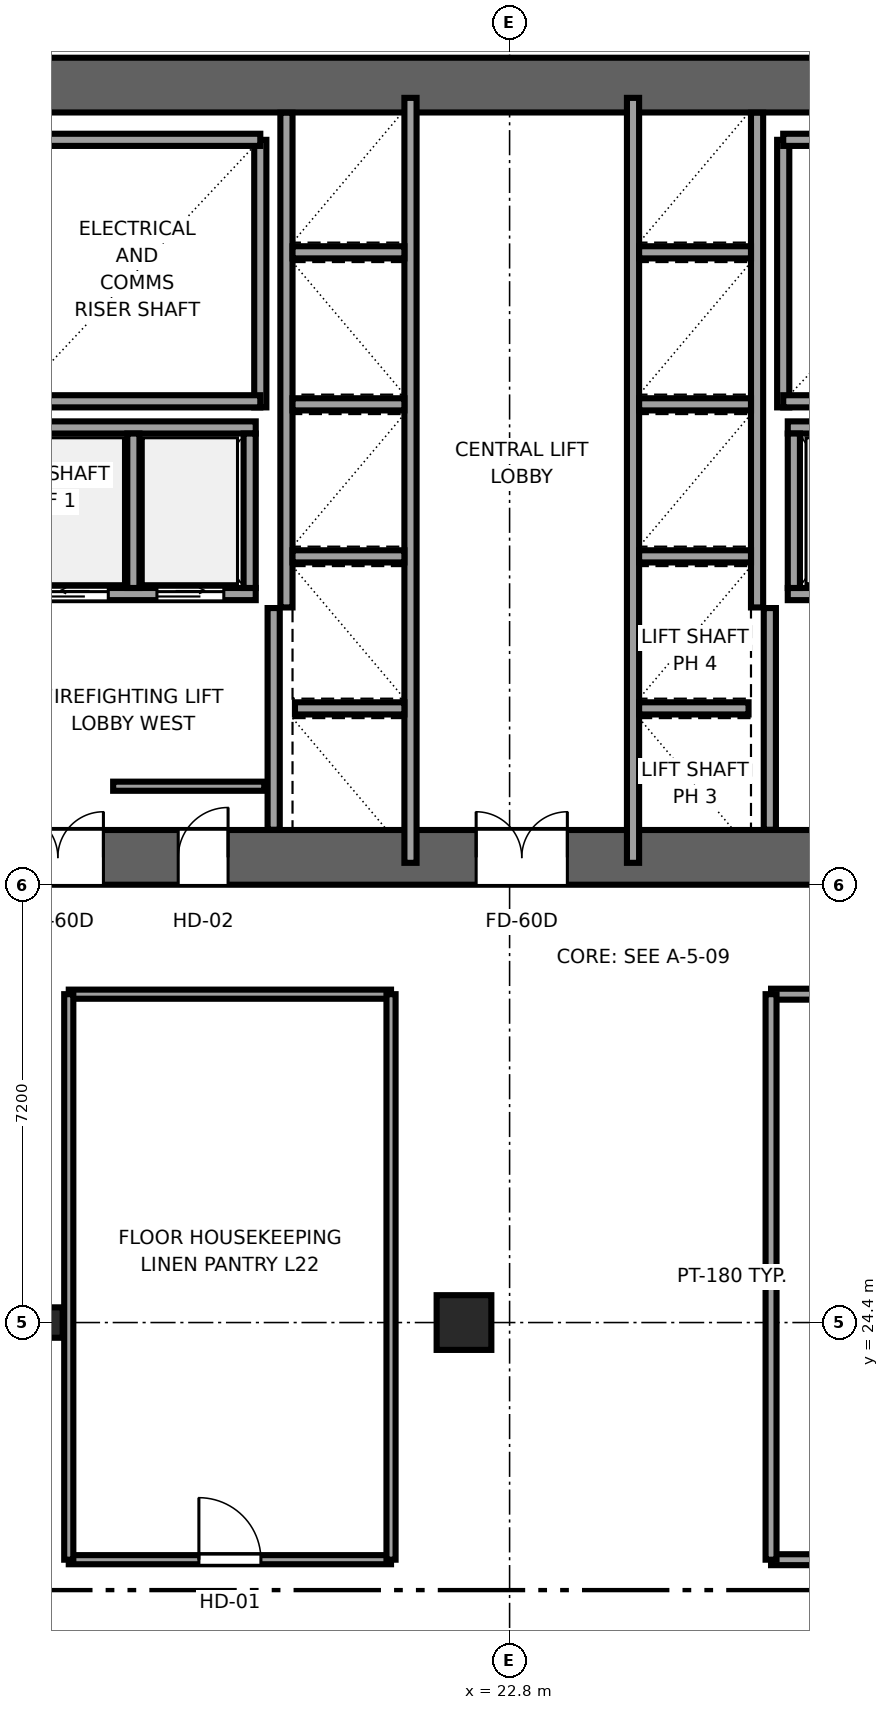
"""IFC4 building model, lengths in metres.
Left out: names, types, materials, properties, quantities, classifications, styles, units other than length and angle.
Written with IfcOpenShell. Run it as: python <this file> out.ifc"""

import sys

from ifc_helpers import new_model, si_unit, direction, frame, frame_2d, origin, origin_2d, place, context, subcontext, project, spatial, rectangle, i_section, extrude, source, transform, mapped, element, fill, save


model = new_model("IFC4")
c1 = context("Model", 3, precision=1e-05, world=origin(), true_north=direction((0.0, 1.0)))
c2 = subcontext(c1, "Body", "Model", "MODEL_VIEW")
j1 = project(units=[si_unit("LENGTHUNIT", "METRE"), si_unit("PLANEANGLEUNIT", "RADIAN")], contexts=[c1])
p1 = place(None, origin())
s1 = spatial("IfcSite", under=j1, at=p1, CompositionType="ELEMENT")
p2 = place(p1, origin())
s2 = spatial("IfcBuilding", under=s1, at=p2, CompositionType="ELEMENT")
p3 = place(p2, frame((0.0, 0.0, 88.8)))
s3 = spatial("IfcBuildingStorey", under=s2, at=p3, CompositionType="ELEMENT", Elevation=88.8)
p4 = place(p3, frame((9.6, 32.05, 0.0), z_axis=(0.0, 0.0, 1.0), x_axis=(1.0, 0.0, 0.0)))
e1 = element("IfcWall", 1, at=p4, inside=s3, PredefinedType="SHEAR", context=c2, shape_type="SweptSolid", body=[
    extrude(rectangle(XDim=26.8, YDim=0.9, at=frame_2d((13.4, 0.0))), origin(), (0.0, 0.0, 1.0), 3.55),
])
p5 = place(p4, frame((6.52, 0.0, 0.0), z_axis=(0.0, 0.0, 1.0), x_axis=(-1.0, 0.0, 0.0)))
e2 = element("IfcOpeningElement", 2, at=p5, cuts=e1, PredefinedType="OPENING", context=c2, shape_type="SweptSolid", body=[
    extrude(rectangle(XDim=1.5, YDim=2.04, at=frame_2d((0.75, 1.02))), frame((0.0, 0.46, 0.0), z_axis=(0.0, -1.0, 0.0), x_axis=(1.0, 0.0, 0.0)), (0.0, 0.0, 1.0), 0.92),
])
p6 = place(p4, frame((14.15, 0.0, 0.0), z_axis=(0.0, 0.0, 1.0), x_axis=(-1.0, 0.0, 0.0)))
e3 = element("IfcOpeningElement", 3, at=p6, cuts=e1, PredefinedType="OPENING", context=c2, shape_type="SweptSolid", body=[
    extrude(rectangle(XDim=1.5, YDim=2.04, at=frame_2d((0.75, 1.02))), frame((0.0, 0.46, 0.0), z_axis=(0.0, -1.0, 0.0), x_axis=(1.0, 0.0, 0.0)), (0.0, 0.0, 1.0), 0.92),
])
p7 = place(p4, frame((20.45, 0.0, 0.0), z_axis=(0.0, 0.0, 1.0), x_axis=(-1.0, 0.0, 0.0)))
e4 = element("IfcOpeningElement", 4, at=p7, cuts=e1, PredefinedType="OPENING", context=c2, shape_type="SweptSolid", body=[
    extrude(rectangle(XDim=1.5, YDim=2.04, at=frame_2d((0.75, 1.02))), frame((0.0, 0.46, 0.0), z_axis=(0.0, -1.0, 0.0), x_axis=(1.0, 0.0, 0.0)), (0.0, 0.0, 1.0), 0.92),
])
p8 = place(p4, frame((8.57, 0.0, 0.0), z_axis=(0.0, 0.0, 1.0), x_axis=(-1.0, 0.0, 0.0)))
e5 = element("IfcOpeningElement", 5, at=p8, cuts=e1, PredefinedType="OPENING", context=c2, shape_type="SweptSolid", body=[
    extrude(rectangle(XDim=0.82, YDim=2.01, at=frame_2d((0.41, 1.005))), frame((0.0, 0.46, 0.0), z_axis=(0.0, -1.0, 0.0), x_axis=(1.0, 0.0, 0.0)), (0.0, 0.0, 1.0), 0.92),
])
p9 = place(p3, frame((9.6, 44.75, 0.0), z_axis=(0.0, 0.0, 1.0), x_axis=(1.0, 0.0, 0.0)))
e6 = element("IfcWall", 6, at=p9, inside=s3, PredefinedType="SHEAR", context=c2, shape_type="SweptSolid", body=[
    extrude(rectangle(XDim=26.8, YDim=0.9, at=frame_2d((13.4, 0.0))), origin(), (0.0, 0.0, 1.0), 3.55),
])
m1 = source(origin(), c2, "Body", "SweptSolid", [
    extrude(i_section(OverallWidth=0.5, OverallDepth=0.5, WebThickness=0.022, FlangeThickness=0.034, at=origin_2d()), origin(), (0.0, 0.0, 1.0), 3.55),
])
p10 = place(p3, frame((15.2, 24.4, 0.0), z_axis=(0.0, 0.0, 1.0), x_axis=(1.0, 0.0, 0.0)))
e7 = element("IfcColumn", 7, at=p10, inside=s3, PredefinedType="COLUMN", context=c2, shape_type="MappedRepresentation", body=[
    mapped(m1, transform((0.0, 0.0, 0.0), x_axis=(1.0, 0.0, 0.0), y_axis=(0.0, 1.0, 0.0), z_axis=(0.0, 0.0, 1.0), scale=1.0)),
])
m2 = source(origin(), c2, "Body", "SweptSolid", [
    extrude(rectangle(XDim=0.9, YDim=0.9, at=origin_2d()), origin(), (0.0, 0.0, 1.0), 3.55),
])
p11 = place(p3, frame((22.05, 24.4, 0.0), z_axis=(0.0, 0.0, 1.0), x_axis=(1.0, 0.0, 0.0)))
e8 = element("IfcColumn", 8, at=p11, inside=s3, PredefinedType="COLUMN", context=c2, shape_type="MappedRepresentation", body=[
    mapped(m2, transform((0.0, 0.0, 0.0), x_axis=(1.0, 0.0, 0.0), y_axis=(0.0, 1.0, 0.0), z_axis=(0.0, 0.0, 1.0), scale=1.0)),
])
p12 = place(p3, frame((18.7, 39.45, 0.0), z_axis=(0.0, 0.0, 1.0), x_axis=(0.0, 1.0, 0.0)))
e9 = element("IfcWall", 9, at=p12, inside=s3, PredefinedType="SOLIDWALL", context=c2, shape_type="SweptSolid", body=[
    extrude(rectangle(XDim=4.4, YDim=0.2, at=frame_2d((2.2, 0.0))), origin(), (0.0, 0.0, 1.0), 3.37),
])
for number, where, z_axis, x_axis in (
    (10, (14.6, 39.55, 0.0), (0.0, 0.0, 1.0), (1.0, 0.0, 0.0)),
    (11, (14.6, 43.85, 0.0), (0.0, 0.0, 1.0), (1.0, 0.0, 0.0)),
):
    element("IfcWall", number, at=place(p3, frame(where, z_axis=z_axis, x_axis=x_axis)), inside=s3, PredefinedType="SOLIDWALL", context=c2, shape_type="SweptSolid", body=[
        extrude(rectangle(XDim=4.1, YDim=0.2, at=frame_2d((2.05, 0.0))), origin(), (0.0, 0.0, 1.0), 3.37),
    ])
p13 = place(p3, frame((27.3, 39.45, 0.0), z_axis=(0.0, 0.0, 1.0), x_axis=(0.0, 1.0, 0.0)))
e12 = element("IfcWall", 12, at=p13, inside=s3, PredefinedType="SOLIDWALL", context=c2, shape_type="SweptSolid", body=[
    extrude(rectangle(XDim=4.4, YDim=0.2, at=frame_2d((2.2, 0.0))), origin(), (0.0, 0.0, 1.0), 3.37),
])
for number, where, z_axis, x_axis in (
    (13, (27.3, 39.55, 0.0), (0.0, 0.0, 1.0), (1.0, 0.0, 0.0)),
    (14, (27.3, 43.85, 0.0), (0.0, 0.0, 1.0), (1.0, 0.0, 0.0)),
):
    element("IfcWall", number, at=place(p3, frame(where, z_axis=z_axis, x_axis=x_axis)), inside=s3, PredefinedType="SOLIDWALL", context=c2, shape_type="SweptSolid", body=[
        extrude(rectangle(XDim=4.1, YDim=0.2, at=frame_2d((2.05, 0.0))), origin(), (0.0, 0.0, 1.0), 3.37),
    ])
for number, where, z_axis, x_axis in (
    (15, (18.92, 32.504, 0.0), (0.0, 0.0, 1.0), (0.0, 1.0, 0.0)),
    (16, (27.08, 32.504, 0.0), (0.0, 0.0, 1.0), (0.0, 1.0, 0.0)),
):
    element("IfcWall", number, at=place(p3, frame(where, z_axis=z_axis, x_axis=x_axis)), inside=s3, PredefinedType="SOLIDWALL", context=c2, shape_type="SweptSolid", body=[
        extrude(rectangle(XDim=3.646, YDim=0.2, at=frame_2d((1.823, 0.0))), origin(), (0.0, 0.0, 1.0), 3.37),
    ])
p14 = place(p3, frame((21.17, 31.96, 0.0), z_axis=(0.0, 0.0, 1.0), x_axis=(0.0, 1.0, 0.0)))
e17 = element("IfcWall", 17, at=p14, inside=s3, PredefinedType="SOLIDWALL", context=c2, shape_type="SweptSolid", body=[
    extrude(rectangle(XDim=12.58, YDim=0.2, at=frame_2d((6.29, 0.0))), origin(), (0.0, 0.0, 1.0), 3.37),
])
p15 = place(p3, frame((19.13, 36.16, 0.0), z_axis=(0.0, 0.0, 1.0), x_axis=(0.0, 1.0, 0.0)))
e18 = element("IfcWall", 18, at=p15, inside=s3, PredefinedType="SOLIDWALL", context=c2, shape_type="SweptSolid", body=[
    extrude(rectangle(XDim=8.136, YDim=0.2, at=frame_2d((4.068, 0.0))), origin(), (0.0, 0.0, 1.0), 3.37),
])
p16 = place(p3, frame((19.27, 34.5, 0.0), z_axis=(0.0, 0.0, 1.0), x_axis=(1.0, 0.0, 0.0)))
e19 = element("IfcWall", 19, at=p16, inside=s3, PredefinedType="SOLIDWALL", context=c2, shape_type="SweptSolid", body=[
    extrude(rectangle(XDim=1.8, YDim=0.2, at=frame_2d((0.9, 0.0))), origin(), (0.0, 0.0, 1.0), 3.37),
])
for number, where, z_axis, x_axis in (
    (20, (19.23, 37.0, 0.0), (0.0, 0.0, 1.0), (1.0, 0.0, 0.0)),
    (21, (19.23, 39.5, 0.0), (0.0, 0.0, 1.0), (1.0, 0.0, 0.0)),
    (22, (19.23, 42.0, 0.0), (0.0, 0.0, 1.0), (1.0, 0.0, 0.0)),
):
    element("IfcWall", number, at=place(p3, frame(where, z_axis=z_axis, x_axis=x_axis)), inside=s3, PredefinedType="SOLIDWALL", context=c2, shape_type="SweptSolid", body=[
        extrude(rectangle(XDim=1.84, YDim=0.2, at=frame_2d((0.92, 0.0))), origin(), (0.0, 0.0, 1.0), 3.37),
    ])
p17 = place(p3, frame((27.375, 36.38, 0.0), z_axis=(0.0, 0.0, 1.0), x_axis=(1.0, 0.0, 0.0)))
e23 = element("IfcWall", 23, at=p17, inside=s3, PredefinedType="SOLIDWALL", context=c2, shape_type="SweptSolid", body=[
    extrude(rectangle(XDim=4.075, YDim=0.2, at=frame_2d((2.038, 0.0))), origin(), (0.0, 0.0, 1.0), 3.37),
])
p18 = place(p17, frame((0.525, 0.0, 0.0)))
e24 = element("IfcOpeningElement", 24, at=p18, cuts=e23, PredefinedType="OPENING", context=c2, shape_type="SweptSolid", body=[
    extrude(rectangle(XDim=1.1, YDim=2.12, at=frame_2d((0.55, 1.06))), frame((0.0, 0.11, 0.0), z_axis=(0.0, -1.0, 0.0), x_axis=(1.0, 0.0, 0.0)), (0.0, 0.0, 1.0), 0.22),
])
p19 = place(p17, frame((2.425, 0.0, 0.0)))
e25 = element("IfcOpeningElement", 25, at=p19, cuts=e23, PredefinedType="OPENING", context=c2, shape_type="SweptSolid", body=[
    extrude(rectangle(XDim=1.1, YDim=2.12, at=frame_2d((0.55, 1.06))), frame((0.0, 0.11, 0.0), z_axis=(0.0, -1.0, 0.0), x_axis=(1.0, 0.0, 0.0)), (0.0, 0.0, 1.0), 0.22),
])
p20 = place(p3, frame((27.375, 39.12, 0.0), z_axis=(0.0, 0.0, 1.0), x_axis=(1.0, 0.0, 0.0)))
e26 = element("IfcWall", 26, at=p20, inside=s3, PredefinedType="SOLIDWALL", context=c2, shape_type="SweptSolid", body=[
    extrude(rectangle(XDim=4.075, YDim=0.2, at=frame_2d((2.038, 0.0))), origin(), (0.0, 0.0, 1.0), 3.37),
])
p21 = place(p3, frame((27.475, 36.48, 0.0), z_axis=(0.0, 0.0, 1.0), x_axis=(0.0, 1.0, 0.0)))
e27 = element("IfcWall", 27, at=p21, inside=s3, PredefinedType="SOLIDWALL", context=c2, shape_type="SweptSolid", body=[
    extrude(rectangle(XDim=2.54, YDim=0.2, at=frame_2d((1.27, 0.0))), origin(), (0.0, 0.0, 1.0), 3.37),
])
p22 = place(p3, frame((14.55, 36.38, 0.0), z_axis=(0.0, 0.0, 1.0), x_axis=(1.0, 0.0, 0.0)))
e28 = element("IfcWall", 28, at=p22, inside=s3, PredefinedType="SOLIDWALL", context=c2, shape_type="SweptSolid", body=[
    extrude(rectangle(XDim=4.075, YDim=0.2, at=frame_2d((2.038, 0.0))), origin(), (0.0, 0.0, 1.0), 3.37),
])
p23 = place(p22, frame((0.55, 0.0, 0.0)))
e29 = element("IfcOpeningElement", 29, at=p23, cuts=e28, PredefinedType="OPENING", context=c2, shape_type="SweptSolid", body=[
    extrude(rectangle(XDim=1.1, YDim=2.12, at=frame_2d((0.55, 1.06))), frame((0.0, 0.11, 0.0), z_axis=(0.0, -1.0, 0.0), x_axis=(1.0, 0.0, 0.0)), (0.0, 0.0, 1.0), 0.22),
])
p24 = place(p22, frame((2.45, 0.0, 0.0)))
e30 = element("IfcOpeningElement", 30, at=p24, cuts=e28, PredefinedType="OPENING", context=c2, shape_type="SweptSolid", body=[
    extrude(rectangle(XDim=1.1, YDim=2.12, at=frame_2d((0.55, 1.06))), frame((0.0, 0.11, 0.0), z_axis=(0.0, -1.0, 0.0), x_axis=(1.0, 0.0, 0.0)), (0.0, 0.0, 1.0), 0.22),
])
p25 = place(p3, frame((14.55, 39.12, 0.0), z_axis=(0.0, 0.0, 1.0), x_axis=(1.0, 0.0, 0.0)))
e31 = element("IfcWall", 31, at=p25, inside=s3, PredefinedType="SOLIDWALL", context=c2, shape_type="SweptSolid", body=[
    extrude(rectangle(XDim=4.075, YDim=0.2, at=frame_2d((2.038, 0.0))), origin(), (0.0, 0.0, 1.0), 3.37),
])
for number, where, z_axis, x_axis in (
    (32, (18.525, 36.48, 0.0), (0.0, 0.0, 1.0), (0.0, 1.0, 0.0)),
    (33, (16.613, 36.48, 0.0), (0.0, 0.0, 1.0), (0.0, 1.0, 0.0)),
):
    element("IfcWall", number, at=place(p3, frame(where, z_axis=z_axis, x_axis=x_axis)), inside=s3, PredefinedType="SOLIDWALL", context=c2, shape_type="SweptSolid", body=[
        extrude(rectangle(XDim=2.54, YDim=0.2, at=frame_2d((1.27, 0.0))), origin(), (0.0, 0.0, 1.0), 3.37),
    ])
p26 = place(p3, frame((24.83, 31.96, 0.0), z_axis=(0.0, 0.0, 1.0), x_axis=(0.0, 1.0, 0.0)))
e34 = element("IfcWall", 34, at=p26, inside=s3, PredefinedType="SOLIDWALL", context=c2, shape_type="SweptSolid", body=[
    extrude(rectangle(XDim=12.58, YDim=0.2, at=frame_2d((6.29, 0.0))), origin(), (0.0, 0.0, 1.0), 3.37),
])
p27 = place(p3, frame((26.87, 36.16, 0.0), z_axis=(0.0, 0.0, 1.0), x_axis=(0.0, 1.0, 0.0)))
e35 = element("IfcWall", 35, at=p27, inside=s3, PredefinedType="SOLIDWALL", context=c2, shape_type="SweptSolid", body=[
    extrude(rectangle(XDim=8.136, YDim=0.2, at=frame_2d((4.068, 0.0))), origin(), (0.0, 0.0, 1.0), 3.37),
])
p28 = place(p3, frame((24.93, 34.5, 0.0), z_axis=(0.0, 0.0, 1.0), x_axis=(1.0, 0.0, 0.0)))
e36 = element("IfcWall", 36, at=p28, inside=s3, PredefinedType="SOLIDWALL", context=c2, shape_type="SweptSolid", body=[
    extrude(rectangle(XDim=1.8, YDim=0.2, at=frame_2d((0.9, 0.0))), origin(), (0.0, 0.0, 1.0), 3.37),
])
for number, where, z_axis, x_axis in (
    (37, (24.93, 37.0, 0.0), (0.0, 0.0, 1.0), (1.0, 0.0, 0.0)),
    (38, (24.93, 39.5, 0.0), (0.0, 0.0, 1.0), (1.0, 0.0, 0.0)),
    (39, (24.93, 42.0, 0.0), (0.0, 0.0, 1.0), (1.0, 0.0, 0.0)),
):
    element("IfcWall", number, at=place(p3, frame(where, z_axis=z_axis, x_axis=x_axis)), inside=s3, PredefinedType="SOLIDWALL", context=c2, shape_type="SweptSolid", body=[
        extrude(rectangle(XDim=1.84, YDim=0.2, at=frame_2d((0.92, 0.0))), origin(), (0.0, 0.0, 1.0), 3.37),
    ])
p29 = place(p3, frame((16.28, 33.22, 0.0), z_axis=(0.0, 0.0, 1.0), x_axis=(1.0, 0.0, 0.0)))
e40 = element("IfcWall", 40, at=p29, inside=s3, PredefinedType="PARTITIONING", context=c2, shape_type="SweptSolid", body=[
    extrude(rectangle(XDim=2.485, YDim=0.15, at=frame_2d((1.242, 0.0))), origin(), (0.0, 0.0, 1.0), 3.37),
])
p30 = place(p3, frame((27.1, 20.5, 0.0), z_axis=(0.0, 0.0, 1.0), x_axis=(1.0, 0.0, 0.0)))
e41 = element("IfcWall", 41, at=p30, inside=s3, PredefinedType="PARTITIONING", context=c2, shape_type="SweptSolid", body=[
    extrude(rectangle(XDim=7.3, YDim=0.18, at=frame_2d((3.65, 0.0))), origin(), (0.0, 0.0, 1.0), 3.37),
])
p31 = place(p30, frame((2.825, 0.0, 0.0)))
e42 = element("IfcOpeningElement", 42, at=p31, cuts=e41, PredefinedType="OPENING", context=c2, shape_type="SweptSolid", body=[
    extrude(rectangle(XDim=1.65, YDim=2.15, at=frame_2d((0.825, 1.075))), frame((0.0, 0.1, 0.0), z_axis=(0.0, -1.0, 0.0), x_axis=(1.0, 0.0, 0.0)), (0.0, 0.0, 1.0), 0.2),
])
p32 = place(p3, frame((27.1, 29.8, 0.0), z_axis=(0.0, 0.0, 1.0), x_axis=(1.0, 0.0, 0.0)))
e43 = element("IfcWall", 43, at=p32, inside=s3, PredefinedType="PARTITIONING", context=c2, shape_type="SweptSolid", body=[
    extrude(rectangle(XDim=7.3, YDim=0.18, at=frame_2d((3.65, 0.0))), origin(), (0.0, 0.0, 1.0), 3.37),
])
p33 = place(p3, frame((27.1, 20.5, 0.0), z_axis=(0.0, 0.0, 1.0), x_axis=(0.0, 1.0, 0.0)))
e44 = element("IfcWall", 44, at=p33, inside=s3, PredefinedType="PARTITIONING", context=c2, shape_type="SweptSolid", body=[
    extrude(rectangle(XDim=9.3, YDim=0.18, at=frame_2d((4.65, 0.0))), origin(), (0.0, 0.0, 1.0), 3.37),
])
p34 = place(p3, frame((15.55, 20.5, 0.0), z_axis=(0.0, 0.0, 1.0), x_axis=(1.0, 0.0, 0.0)))
e45 = element("IfcWall", 45, at=p34, inside=s3, PredefinedType="PARTITIONING", context=c2, shape_type="SweptSolid", body=[
    extrude(rectangle(XDim=5.3, YDim=0.15, at=frame_2d((2.65, 0.0))), origin(), (0.0, 0.0, 1.0), 3.37),
])
p35 = place(p34, frame((2.14, 0.0, 0.0)))
e46 = element("IfcOpeningElement", 46, at=p35, cuts=e45, PredefinedType="OPENING", context=c2, shape_type="SweptSolid", body=[
    extrude(rectangle(XDim=1.02, YDim=2.03, at=frame_2d((0.51, 1.015))), frame((0.0, 0.085, 0.0), z_axis=(0.0, -1.0, 0.0), x_axis=(1.0, 0.0, 0.0)), (0.0, 0.0, 1.0), 0.17),
])
p36 = place(p3, frame((15.55, 29.8, 0.0), z_axis=(0.0, 0.0, 1.0), x_axis=(1.0, 0.0, 0.0)))
e47 = element("IfcWall", 47, at=p36, inside=s3, PredefinedType="PARTITIONING", context=c2, shape_type="SweptSolid", body=[
    extrude(rectangle(XDim=5.3, YDim=0.15, at=frame_2d((2.65, 0.0))), origin(), (0.0, 0.0, 1.0), 3.37),
])
for number, where, z_axis, x_axis in (
    (48, (15.55, 20.5, 0.0), (0.0, 0.0, 1.0), (0.0, 1.0, 0.0)),
    (49, (20.85, 20.5, 0.0), (0.0, 0.0, 1.0), (0.0, 1.0, 0.0)),
):
    element("IfcWall", number, at=place(p3, frame(where, z_axis=z_axis, x_axis=x_axis)), inside=s3, PredefinedType="PARTITIONING", context=c2, shape_type="SweptSolid", body=[
        extrude(rectangle(XDim=9.3, YDim=0.15, at=frame_2d((4.65, 0.0))), origin(), (0.0, 0.0, 1.0), 3.37),
    ])
m3 = source(origin(), c2, "Body", "SweptSolid", [
    extrude(rectangle(XDim=1.5, YDim=2.04, at=frame_2d((0.75, 1.02))), frame((0.0, 0.025, 0.0), z_axis=(0.0, -1.0, 0.0), x_axis=(1.0, 0.0, 0.0)), (0.0, 0.0, 1.0), 0.05),
])
p37 = place(p5, origin())
e50 = element("IfcDoor", 50, at=p37, inside=s3, OperationType="DOUBLE_DOOR_SINGLE_SWING", PredefinedType="DOOR", context=c2, shape_type="MappedRepresentation", body=[
    mapped(m3, transform((0.0, 0.0, 0.0), x_axis=(1.0, 0.0, 0.0), y_axis=(0.0, 1.0, 0.0), z_axis=(0.0, 0.0, 1.0), scale=1.0)),
])
fill(e2, e50)
p38 = place(p6, origin())
e51 = element("IfcDoor", 51, at=p38, inside=s3, OperationType="DOUBLE_DOOR_SINGLE_SWING", PredefinedType="DOOR", context=c2, shape_type="MappedRepresentation", body=[
    mapped(m3, transform((0.0, 0.0, 0.0), x_axis=(1.0, 0.0, 0.0), y_axis=(0.0, 1.0, 0.0), z_axis=(0.0, 0.0, 1.0), scale=1.0)),
])
fill(e3, e51)
m4 = source(origin(), c2, "Body", "SweptSolid", [
    extrude(rectangle(XDim=0.82, YDim=2.01, at=frame_2d((0.41, 1.005))), frame((0.0, 0.025, 0.0), z_axis=(0.0, -1.0, 0.0), x_axis=(1.0, 0.0, 0.0)), (0.0, 0.0, 1.0), 0.05),
])
p39 = place(p8, origin())
e52 = element("IfcDoor", 52, at=p39, inside=s3, OperationType="SINGLE_SWING_RIGHT", PredefinedType="DOOR", context=c2, shape_type="MappedRepresentation", body=[
    mapped(m4, transform((0.0, 0.0, 0.0), x_axis=(1.0, 0.0, 0.0), y_axis=(0.0, 1.0, 0.0), z_axis=(0.0, 0.0, 1.0), scale=1.0)),
])
fill(e5, e52)
m5 = source(origin(), c2, "Body", "SweptSolid", [
    extrude(rectangle(XDim=1.1, YDim=2.12, at=frame_2d((0.55, 1.06))), frame((0.0, 0.025, 0.0), z_axis=(0.0, -1.0, 0.0), x_axis=(1.0, 0.0, 0.0)), (0.0, 0.0, 1.0), 0.05),
])
p40 = place(p23, origin())
e53 = element("IfcDoor", 53, at=p40, inside=s3, OperationType="SLIDING_TO_LEFT", PredefinedType="DOOR", context=c2, shape_type="MappedRepresentation", body=[
    mapped(m5, transform((0.0, 0.0, 0.0), x_axis=(1.0, 0.0, 0.0), y_axis=(0.0, 1.0, 0.0), z_axis=(0.0, 0.0, 1.0), scale=1.0)),
])
fill(e29, e53)
p41 = place(p24, origin())
e54 = element("IfcDoor", 54, at=p41, inside=s3, OperationType="SLIDING_TO_RIGHT", PredefinedType="DOOR", context=c2, shape_type="MappedRepresentation", body=[
    mapped(m5, transform((0.0, 0.0, 0.0), x_axis=(1.0, 0.0, 0.0), y_axis=(0.0, 1.0, 0.0), z_axis=(0.0, 0.0, 1.0), scale=1.0)),
])
fill(e30, e54)
m6 = source(origin(), c2, "Body", "SweptSolid", [
    extrude(rectangle(XDim=1.02, YDim=2.03, at=frame_2d((0.51, 1.015))), frame((0.0, 0.025, 0.0), z_axis=(0.0, -1.0, 0.0), x_axis=(1.0, 0.0, 0.0)), (0.0, 0.0, 1.0), 0.05),
])
p42 = place(p35, origin())
e55 = element("IfcDoor", 55, at=p42, inside=s3, OperationType="SINGLE_SWING_LEFT", PredefinedType="DOOR", context=c2, shape_type="MappedRepresentation", body=[
    mapped(m6, transform((0.0, 0.0, 0.0), x_axis=(1.0, 0.0, 0.0), y_axis=(0.0, 1.0, 0.0), z_axis=(0.0, 0.0, 1.0), scale=1.0)),
])
fill(e46, e55)
save(model, sys.argv[1])
